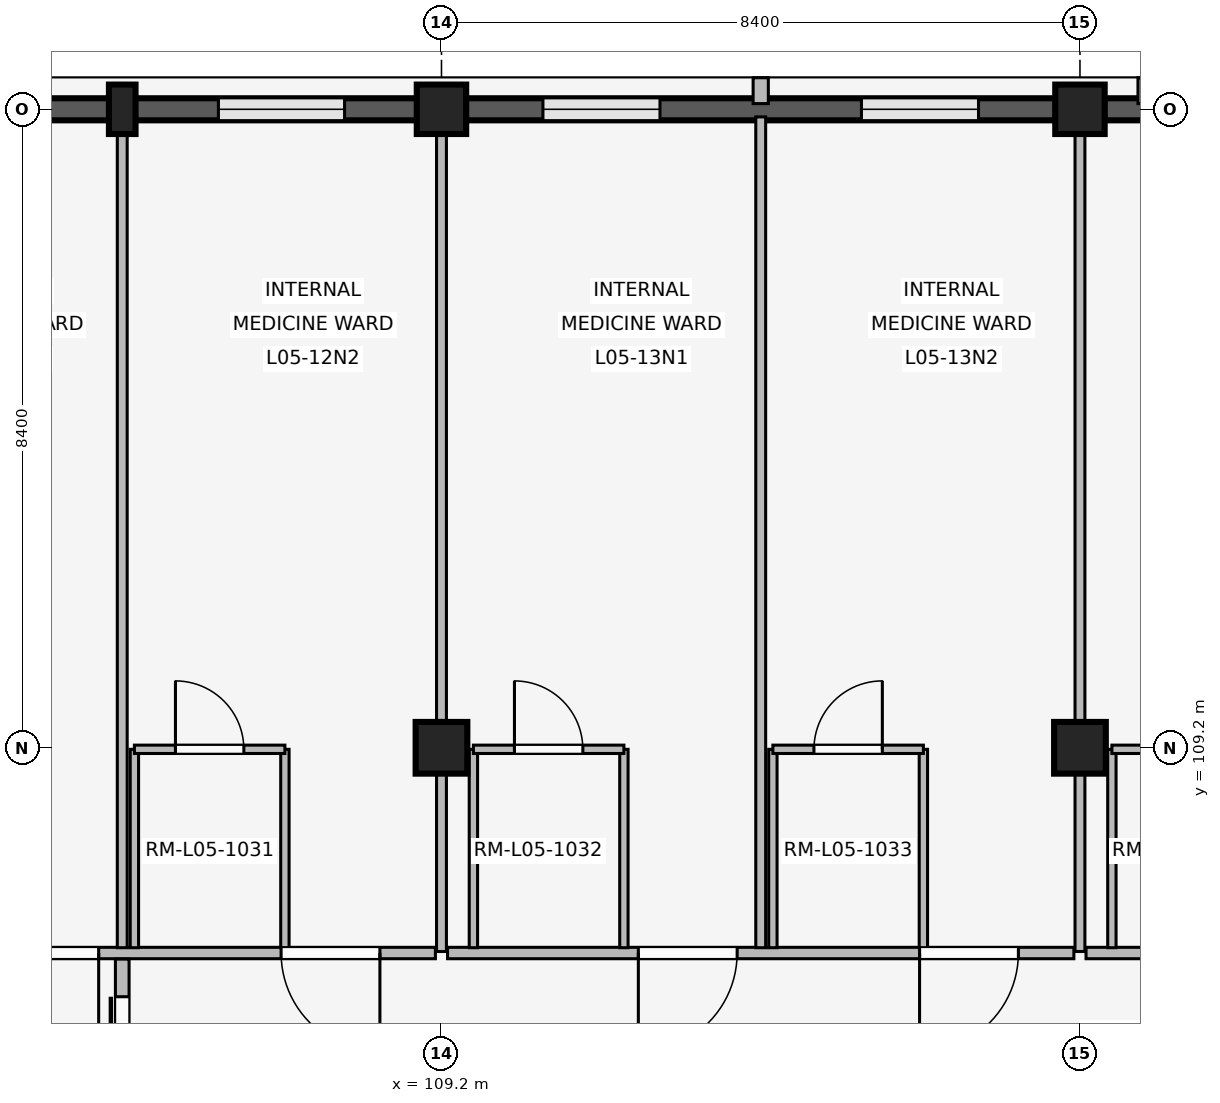
"""IFC4 building model, lengths in metres.
Left out: names, types, materials, properties, quantities, classifications, styles, units other than length and angle.
Written with IfcOpenShell. Run it as: python <this file> out.ifc"""

import sys

from ifc_helpers import new_model, si_unit, direction, frame, frame_2d, origin, origin_2d, place, context, subcontext, project, spatial, rectangle, extrude, element, fill, save


model = new_model("IFC4")
c1 = context("Model", 3, precision=1e-05, world=origin(), true_north=direction((0.0, 1.0)))
c2 = subcontext(c1, "Body", "Model", "MODEL_VIEW")
j1 = project(units=[si_unit("LENGTHUNIT", "METRE"), si_unit("PLANEANGLEUNIT", "RADIAN")], contexts=[c1])
p1 = place(None, origin())
s1 = spatial("IfcSite", under=j1, at=p1, CompositionType="ELEMENT")
p2 = place(p1, origin())
s2 = spatial("IfcBuilding", under=s1, at=p2, CompositionType="ELEMENT")
p3 = place(p2, frame((0.0, 0.0, 20.4)))
s3 = spatial("IfcBuildingStorey", under=s2, at=p3, CompositionType="ELEMENT", Elevation=20.4)
p4 = place(p3, frame((109.2, 109.2, 0.0), z_axis=(0.0, 0.0, 1.0), x_axis=(1.0, 0.0, 0.0)))
e1 = element("IfcColumn", 1, at=p4, inside=s3, PredefinedType="COLUMN", context=c2, shape_type="SweptSolid", body=[
    extrude(rectangle(XDim=0.68, YDim=0.68, at=origin_2d()), origin(), (0.0, 0.0, 1.0), 4.2),
])
p5 = place(p3, frame((109.2, 117.6, 0.0), z_axis=(0.0, 0.0, 1.0), x_axis=(1.0, 0.0, 0.0)))
e2 = element("IfcColumn", 2, at=p5, inside=s3, PredefinedType="COLUMN", context=c2, shape_type="SweptSolid", body=[
    extrude(rectangle(XDim=0.65, YDim=0.65, at=origin_2d()), origin(), (0.0, 0.0, 1.0), 4.2),
])
p6 = place(p3, frame((117.6, 109.2, 0.0), z_axis=(0.0, 0.0, 1.0), x_axis=(1.0, 0.0, 0.0)))
e3 = element("IfcColumn", 3, at=p6, inside=s3, PredefinedType="COLUMN", context=c2, shape_type="SweptSolid", body=[
    extrude(rectangle(XDim=0.68, YDim=0.68, at=origin_2d()), origin(), (0.0, 0.0, 1.0), 4.2),
])
p7 = place(p3, frame((117.6, 117.6, 0.0), z_axis=(0.0, 0.0, 1.0), x_axis=(1.0, 0.0, 0.0)))
e4 = element("IfcColumn", 4, at=p7, inside=s3, PredefinedType="COLUMN", context=c2, shape_type="SweptSolid", body=[
    extrude(rectangle(XDim=0.65, YDim=0.65, at=origin_2d()), origin(), (0.0, 0.0, 1.0), 4.2),
])
p8 = place(p3, frame((105.0, 117.6, 0.0), z_axis=(0.0, 0.0, 1.0), x_axis=(1.0, 0.0, 0.0)))
e5 = element("IfcColumn", 5, at=p8, inside=s3, PredefinedType="PILASTER", context=c2, shape_type="SweptSolid", body=[
    extrude(rectangle(XDim=0.35, YDim=0.65, at=origin_2d()), origin(), (0.0, 0.0, 1.0), 4.2),
])
p9 = place(p3, frame((101.12, 117.6, 0.0), z_axis=(0.0, 0.0, 1.0), x_axis=(1.0, 0.0, 0.0)))
e6 = element("IfcWall", 6, at=p9, inside=s3, PredefinedType="SOLIDWALL", context=c2, shape_type="SweptSolid", body=[
    extrude(rectangle(XDim=7.76, YDim=0.29, at=frame_2d((3.88, 0.0))), origin(), (0.0, 0.0, 1.0), 3.34),
])
p10 = place(p9, frame((0.955, 0.0, 0.85)))
e7 = element("IfcOpeningElement", 7, at=p10, cuts=e6, PredefinedType="OPENING", context=c2, shape_type="SweptSolid", body=[
    extrude(rectangle(XDim=1.66, YDim=1.95, at=frame_2d((0.83, 0.975))), frame((0.0, 0.155, 0.0), z_axis=(0.0, -1.0, 0.0), x_axis=(1.0, 0.0, 0.0)), (0.0, 0.0, 1.0), 0.31),
])
p11 = place(p9, frame((5.145, 0.0, 0.85)))
e8 = element("IfcOpeningElement", 8, at=p11, cuts=e6, PredefinedType="OPENING", context=c2, shape_type="SweptSolid", body=[
    extrude(rectangle(XDim=1.66, YDim=1.95, at=frame_2d((0.83, 0.975))), frame((0.0, 0.155, 0.0), z_axis=(0.0, -1.0, 0.0), x_axis=(1.0, 0.0, 0.0)), (0.0, 0.0, 1.0), 0.31),
])
p12 = place(p3, frame((109.52, 117.6, 0.0), z_axis=(0.0, 0.0, 1.0), x_axis=(1.0, 0.0, 0.0)))
e9 = element("IfcWall", 9, at=p12, inside=s3, PredefinedType="SOLIDWALL", context=c2, shape_type="SweptSolid", body=[
    extrude(rectangle(XDim=7.76, YDim=0.29, at=frame_2d((3.88, 0.0))), origin(), (0.0, 0.0, 1.0), 3.34),
])
p13 = place(p12, frame((1.015, 0.0, 0.85)))
e10 = element("IfcOpeningElement", 10, at=p13, cuts=e9, PredefinedType="OPENING", context=c2, shape_type="SweptSolid", body=[
    extrude(rectangle(XDim=1.54, YDim=1.85, at=frame_2d((0.77, 0.925))), frame((0.0, 0.155, 0.0), z_axis=(0.0, -1.0, 0.0), x_axis=(1.0, 0.0, 0.0)), (0.0, 0.0, 1.0), 0.31),
])
p14 = place(p12, frame((5.205, 0.0, 0.85)))
e11 = element("IfcOpeningElement", 11, at=p14, cuts=e9, PredefinedType="OPENING", context=c2, shape_type="SweptSolid", body=[
    extrude(rectangle(XDim=1.54, YDim=1.85, at=frame_2d((0.77, 0.925))), frame((0.0, 0.155, 0.0), z_axis=(0.0, -1.0, 0.0), x_axis=(1.0, 0.0, 0.0)), (0.0, 0.0, 1.0), 0.31),
])
p15 = place(p3, frame((113.4, 117.675, 0.0), z_axis=(0.0, 0.0, 1.0), x_axis=(0.0, 1.0, 0.0)))
e12 = element("IfcWall", 12, at=p15, inside=s3, PredefinedType="ELEMENTEDWALL", context=c2, shape_type="SweptSolid", body=[
    extrude(rectangle(XDim=0.34, YDim=0.2, at=frame_2d((0.17, 0.0))), origin(), (0.0, 0.0, 1.0), 3.32),
])
p16 = place(p3, frame((117.92, 117.6, 0.0), z_axis=(0.0, 0.0, 1.0), x_axis=(1.0, 0.0, 0.0)))
e13 = element("IfcWall", 13, at=p16, inside=s3, PredefinedType="SOLIDWALL", context=c2, shape_type="SweptSolid", body=[
    extrude(rectangle(XDim=7.76, YDim=0.29, at=frame_2d((3.88, 0.0))), origin(), (0.0, 0.0, 1.0), 3.34),
])
p17 = place(p16, frame((0.945, 0.0, 0.85)))
e14 = element("IfcOpeningElement", 14, at=p17, cuts=e13, PredefinedType="OPENING", context=c2, shape_type="SweptSolid", body=[
    extrude(rectangle(XDim=1.68, YDim=2.05, at=frame_2d((0.84, 1.025))), frame((0.0, 0.155, 0.0), z_axis=(0.0, -1.0, 0.0), x_axis=(1.0, 0.0, 0.0)), (0.0, 0.0, 1.0), 0.31),
])
p18 = place(p16, frame((5.135, 0.0, 0.85)))
e15 = element("IfcOpeningElement", 15, at=p18, cuts=e13, PredefinedType="OPENING", context=c2, shape_type="SweptSolid", body=[
    extrude(rectangle(XDim=1.68, YDim=2.05, at=frame_2d((0.84, 1.025))), frame((0.0, 0.155, 0.0), z_axis=(0.0, -1.0, 0.0), x_axis=(1.0, 0.0, 0.0)), (0.0, 0.0, 1.0), 0.31),
])
p19 = place(p3, frame((118.463, 117.675, 0.0), z_axis=(0.0, 0.0, 1.0), x_axis=(0.0, 1.0, 0.0)))
e16 = element("IfcWall", 16, at=p19, inside=s3, PredefinedType="ELEMENTEDWALL", context=c2, shape_type="SweptSolid", body=[
    extrude(rectangle(XDim=0.34, YDim=0.2, at=frame_2d((0.17, 0.0))), origin(), (0.0, 0.0, 1.0), 3.32),
])
p20 = place(p3, frame((109.12, 106.5, 0.0), z_axis=(0.0, 0.0, 1.0), x_axis=(-1.0, 0.0, 0.0)))
e17 = element("IfcWall", 17, at=p20, inside=s3, PredefinedType="PARTITIONING", context=c2, shape_type="SweptSolid", body=[
    extrude(rectangle(XDim=8.24, YDim=0.15, at=frame_2d((4.12, 0.0))), origin(), (0.0, 0.0, 1.0), 3.32),
])
p21 = place(p20, frame((0.73, 0.0, 0.0)))
e18 = element("IfcOpeningElement", 18, at=p21, cuts=e17, PredefinedType="OPENING", context=c2, shape_type="SweptSolid", body=[
    extrude(rectangle(XDim=1.3, YDim=2.25, at=frame_2d((0.65, 1.125))), frame((0.0, 0.085, 0.0), z_axis=(0.0, -1.0, 0.0), x_axis=(1.0, 0.0, 0.0)), (0.0, 0.0, 1.0), 0.17),
])
p22 = place(p20, frame((4.43, 0.0, 0.0)))
e19 = element("IfcOpeningElement", 19, at=p22, cuts=e17, PredefinedType="OPENING", context=c2, shape_type="SweptSolid", body=[
    extrude(rectangle(XDim=1.3, YDim=2.25, at=frame_2d((0.65, 1.125))), frame((0.0, 0.085, 0.0), z_axis=(0.0, -1.0, 0.0), x_axis=(1.0, 0.0, 0.0)), (0.0, 0.0, 1.0), 0.17),
])
p23 = place(p3, frame((105.0, 106.57, 0.0), z_axis=(0.0, 0.0, 1.0), x_axis=(0.0, 1.0, 0.0)))
e20 = element("IfcWall", 20, at=p23, inside=s3, PredefinedType="PARTITIONING", context=c2, shape_type="SweptSolid", body=[
    extrude(rectangle(XDim=10.93, YDim=0.13, at=frame_2d((5.465, 0.0))), origin(), (0.0, 0.0, 1.0), 3.32),
])
for number, where, z_axis, x_axis in (
    (21, (105.16, 106.57, 0.0), (0.0, 0.0, 1.0), (0.0, 1.0, 0.0)),
    (22, (107.14, 106.57, 0.0), (0.0, 0.0, 1.0), (0.0, 1.0, 0.0)),
):
    element("IfcWall", number, at=place(p3, frame(where, z_axis=z_axis, x_axis=x_axis)), inside=s3, PredefinedType="PARTITIONING", context=c2, shape_type="SweptSolid", body=[
        extrude(rectangle(XDim=2.61, YDim=0.11, at=frame_2d((1.305, 0.0))), origin(), (0.0, 0.0, 1.0), 3.32),
    ])
p24 = place(p3, frame((105.16, 109.18, 0.0), z_axis=(0.0, 0.0, 1.0), x_axis=(1.0, 0.0, 0.0)))
e23 = element("IfcWall", 23, at=p24, inside=s3, PredefinedType="PARTITIONING", context=c2, shape_type="SweptSolid", body=[
    extrude(rectangle(XDim=1.98, YDim=0.11, at=frame_2d((0.99, 0.0))), origin(), (0.0, 0.0, 1.0), 3.32),
])
p25 = place(p24, frame((0.54, 0.0, 0.0)))
e24 = element("IfcOpeningElement", 24, at=p25, cuts=e23, PredefinedType="OPENING", context=c2, shape_type="SweptSolid", body=[
    extrude(rectangle(XDim=0.9, YDim=2.1, at=frame_2d((0.45, 1.05))), frame((0.0, 0.065, 0.0), z_axis=(0.0, -1.0, 0.0), x_axis=(1.0, 0.0, 0.0)), (0.0, 0.0, 1.0), 0.13),
])
p26 = place(p3, frame((105.0, 103.58, 0.0), z_axis=(0.0, 0.0, 1.0), x_axis=(0.0, 1.0, 0.0)))
e25 = element("IfcWall", 25, at=p26, inside=s3, PredefinedType="PARTITIONING", context=c2, shape_type="SweptSolid", body=[
    extrude(rectangle(XDim=2.84, YDim=0.18, at=frame_2d((1.42, 0.0))), origin(), (0.0, 0.0, 1.0), 3.32),
])
p27 = place(p26, frame((0.495, 0.0, 0.0)))
e26 = element("IfcOpeningElement", 26, at=p27, cuts=e25, PredefinedType="OPENING", context=c2, shape_type="SweptSolid", body=[
    extrude(rectangle(XDim=1.85, YDim=2.3, at=frame_2d((0.925, 1.15))), frame((0.0, 0.1, 0.0), z_axis=(0.0, -1.0, 0.0), x_axis=(1.0, 0.0, 0.0)), (0.0, 0.0, 1.0), 0.2),
])
p28 = place(p3, frame((109.2, 106.52, 0.0), z_axis=(0.0, 0.0, 1.0), x_axis=(0.0, 1.0, 0.0)))
e27 = element("IfcWall", 27, at=p28, inside=s3, PredefinedType="PARTITIONING", context=c2, shape_type="SweptSolid", body=[
    extrude(rectangle(XDim=10.94, YDim=0.13, at=frame_2d((5.47, 0.0))), origin(), (0.0, 0.0, 1.0), 3.32),
])
p29 = place(p3, frame((117.52, 106.5, 0.0), z_axis=(0.0, 0.0, 1.0), x_axis=(-1.0, 0.0, 0.0)))
e28 = element("IfcWall", 28, at=p29, inside=s3, PredefinedType="PARTITIONING", context=c2, shape_type="SweptSolid", body=[
    extrude(rectangle(XDim=8.24, YDim=0.15, at=frame_2d((4.12, 0.0))), origin(), (0.0, 0.0, 1.0), 3.32),
])
p30 = place(p29, frame((0.73, 0.0, 0.0)))
e29 = element("IfcOpeningElement", 29, at=p30, cuts=e28, PredefinedType="OPENING", context=c2, shape_type="SweptSolid", body=[
    extrude(rectangle(XDim=1.3, YDim=2.25, at=frame_2d((0.65, 1.125))), frame((0.0, 0.085, 0.0), z_axis=(0.0, -1.0, 0.0), x_axis=(1.0, 0.0, 0.0)), (0.0, 0.0, 1.0), 0.17),
])
p31 = place(p29, frame((4.43, 0.0, 0.0)))
e30 = element("IfcOpeningElement", 30, at=p31, cuts=e28, PredefinedType="OPENING", context=c2, shape_type="SweptSolid", body=[
    extrude(rectangle(XDim=1.3, YDim=2.25, at=frame_2d((0.65, 1.125))), frame((0.0, 0.085, 0.0), z_axis=(0.0, -1.0, 0.0), x_axis=(1.0, 0.0, 0.0)), (0.0, 0.0, 1.0), 0.17),
])
p32 = place(p3, frame((113.4, 106.57, 0.0), z_axis=(0.0, 0.0, 1.0), x_axis=(0.0, 1.0, 0.0)))
e31 = element("IfcWall", 31, at=p32, inside=s3, PredefinedType="PARTITIONING", context=c2, shape_type="SweptSolid", body=[
    extrude(rectangle(XDim=10.93, YDim=0.13, at=frame_2d((5.465, 0.0))), origin(), (0.0, 0.0, 1.0), 3.32),
])
for number, where, z_axis, x_axis in (
    (32, (109.62, 106.57, 0.0), (0.0, 0.0, 1.0), (0.0, 1.0, 0.0)),
    (33, (111.6, 106.57, 0.0), (0.0, 0.0, 1.0), (0.0, 1.0, 0.0)),
):
    element("IfcWall", number, at=place(p3, frame(where, z_axis=z_axis, x_axis=x_axis)), inside=s3, PredefinedType="PARTITIONING", context=c2, shape_type="SweptSolid", body=[
        extrude(rectangle(XDim=2.61, YDim=0.11, at=frame_2d((1.305, 0.0))), origin(), (0.0, 0.0, 1.0), 3.32),
    ])
p33 = place(p3, frame((109.62, 109.18, 0.0), z_axis=(0.0, 0.0, 1.0), x_axis=(1.0, 0.0, 0.0)))
e34 = element("IfcWall", 34, at=p33, inside=s3, PredefinedType="PARTITIONING", context=c2, shape_type="SweptSolid", body=[
    extrude(rectangle(XDim=1.98, YDim=0.11, at=frame_2d((0.99, 0.0))), origin(), (0.0, 0.0, 1.0), 3.32),
])
p34 = place(p33, frame((0.54, 0.0, 0.0)))
e35 = element("IfcOpeningElement", 35, at=p34, cuts=e34, PredefinedType="OPENING", context=c2, shape_type="SweptSolid", body=[
    extrude(rectangle(XDim=0.9, YDim=2.1, at=frame_2d((0.45, 1.05))), frame((0.0, 0.065, 0.0), z_axis=(0.0, -1.0, 0.0), x_axis=(1.0, 0.0, 0.0)), (0.0, 0.0, 1.0), 0.13),
])
for number, where, z_axis, x_axis in (
    (36, (113.56, 106.57, 0.0), (0.0, 0.0, 1.0), (0.0, 1.0, 0.0)),
    (37, (115.54, 106.57, 0.0), (0.0, 0.0, 1.0), (0.0, 1.0, 0.0)),
):
    element("IfcWall", number, at=place(p3, frame(where, z_axis=z_axis, x_axis=x_axis)), inside=s3, PredefinedType="PARTITIONING", context=c2, shape_type="SweptSolid", body=[
        extrude(rectangle(XDim=2.61, YDim=0.11, at=frame_2d((1.305, 0.0))), origin(), (0.0, 0.0, 1.0), 3.32),
    ])
p35 = place(p3, frame((113.56, 109.18, 0.0), z_axis=(0.0, 0.0, 1.0), x_axis=(1.0, 0.0, 0.0)))
e38 = element("IfcWall", 38, at=p35, inside=s3, PredefinedType="PARTITIONING", context=c2, shape_type="SweptSolid", body=[
    extrude(rectangle(XDim=1.98, YDim=0.11, at=frame_2d((0.99, 0.0))), origin(), (0.0, 0.0, 1.0), 3.32),
])
p36 = place(p35, frame((0.54, 0.0, 0.0)))
e39 = element("IfcOpeningElement", 39, at=p36, cuts=e38, PredefinedType="OPENING", context=c2, shape_type="SweptSolid", body=[
    extrude(rectangle(XDim=0.9, YDim=2.1, at=frame_2d((0.45, 1.05))), frame((0.0, 0.065, 0.0), z_axis=(0.0, -1.0, 0.0), x_axis=(1.0, 0.0, 0.0)), (0.0, 0.0, 1.0), 0.13),
])
p37 = place(p3, frame((117.6, 106.52, 0.0), z_axis=(0.0, 0.0, 1.0), x_axis=(0.0, 1.0, 0.0)))
e40 = element("IfcWall", 40, at=p37, inside=s3, PredefinedType="PARTITIONING", context=c2, shape_type="SweptSolid", body=[
    extrude(rectangle(XDim=10.94, YDim=0.13, at=frame_2d((5.47, 0.0))), origin(), (0.0, 0.0, 1.0), 3.32),
])
p38 = place(p3, frame((125.92, 106.5, 0.0), z_axis=(0.0, 0.0, 1.0), x_axis=(-1.0, 0.0, 0.0)))
e41 = element("IfcWall", 41, at=p38, inside=s3, PredefinedType="PARTITIONING", context=c2, shape_type="SweptSolid", body=[
    extrude(rectangle(XDim=8.24, YDim=0.15, at=frame_2d((4.12, 0.0))), origin(), (0.0, 0.0, 1.0), 3.32),
])
p39 = place(p38, frame((0.73, 0.0, 0.0)))
e42 = element("IfcOpeningElement", 42, at=p39, cuts=e41, PredefinedType="OPENING", context=c2, shape_type="SweptSolid", body=[
    extrude(rectangle(XDim=1.3, YDim=2.25, at=frame_2d((0.65, 1.125))), frame((0.0, 0.085, 0.0), z_axis=(0.0, -1.0, 0.0), x_axis=(1.0, 0.0, 0.0)), (0.0, 0.0, 1.0), 0.17),
])
p40 = place(p38, frame((4.43, 0.0, 0.0)))
e43 = element("IfcOpeningElement", 43, at=p40, cuts=e41, PredefinedType="OPENING", context=c2, shape_type="SweptSolid", body=[
    extrude(rectangle(XDim=1.3, YDim=2.25, at=frame_2d((0.65, 1.125))), frame((0.0, 0.085, 0.0), z_axis=(0.0, -1.0, 0.0), x_axis=(1.0, 0.0, 0.0)), (0.0, 0.0, 1.0), 0.17),
])
p41 = place(p3, frame((118.02, 106.57, 0.0), z_axis=(0.0, 0.0, 1.0), x_axis=(0.0, 1.0, 0.0)))
e44 = element("IfcWall", 44, at=p41, inside=s3, PredefinedType="PARTITIONING", context=c2, shape_type="SweptSolid", body=[
    extrude(rectangle(XDim=2.61, YDim=0.11, at=frame_2d((1.305, 0.0))), origin(), (0.0, 0.0, 1.0), 3.32),
])
p42 = place(p3, frame((118.02, 109.18, 0.0), z_axis=(0.0, 0.0, 1.0), x_axis=(1.0, 0.0, 0.0)))
e45 = element("IfcWall", 45, at=p42, inside=s3, PredefinedType="PARTITIONING", context=c2, shape_type="SweptSolid", body=[
    extrude(rectangle(XDim=1.98, YDim=0.11, at=frame_2d((0.99, 0.0))), origin(), (0.0, 0.0, 1.0), 3.32),
])
p43 = place(p42, frame((0.54, 0.0, 0.0)))
e46 = element("IfcOpeningElement", 46, at=p43, cuts=e45, PredefinedType="OPENING", context=c2, shape_type="SweptSolid", body=[
    extrude(rectangle(XDim=0.9, YDim=2.1, at=frame_2d((0.45, 1.05))), frame((0.0, 0.065, 0.0), z_axis=(0.0, -1.0, 0.0), x_axis=(1.0, 0.0, 0.0)), (0.0, 0.0, 1.0), 0.13),
])
p44 = place(p11, origin())
e47 = element("IfcWindow", 47, at=p44, inside=s3, PartitioningType="SINGLE_PANEL", PredefinedType="WINDOW", context=c2, shape_type="SweptSolid", body=[
    extrude(rectangle(XDim=1.66, YDim=1.95, at=frame_2d((0.83, 0.975))), frame((0.0, 0.03, 0.0), z_axis=(0.0, -1.0, 0.0), x_axis=(1.0, 0.0, 0.0)), (0.0, 0.0, 1.0), 0.06),
])
fill(e8, e47)
p45 = place(p13, origin())
e48 = element("IfcWindow", 48, at=p45, inside=s3, PartitioningType="SINGLE_PANEL", PredefinedType="WINDOW", context=c2, shape_type="SweptSolid", body=[
    extrude(rectangle(XDim=1.54, YDim=1.85, at=frame_2d((0.77, 0.925))), frame((0.0, 0.03, 0.0), z_axis=(0.0, -1.0, 0.0), x_axis=(1.0, 0.0, 0.0)), (0.0, 0.0, 1.0), 0.06),
])
fill(e10, e48)
p46 = place(p14, origin())
e49 = element("IfcWindow", 49, at=p46, inside=s3, PartitioningType="SINGLE_PANEL", PredefinedType="WINDOW", context=c2, shape_type="SweptSolid", body=[
    extrude(rectangle(XDim=1.54, YDim=1.85, at=frame_2d((0.77, 0.925))), frame((0.0, 0.03, 0.0), z_axis=(0.0, -1.0, 0.0), x_axis=(1.0, 0.0, 0.0)), (0.0, 0.0, 1.0), 0.06),
])
fill(e11, e49)
p47 = place(p21, origin())
e50 = element("IfcDoor", 50, at=p47, inside=s3, OperationType="SINGLE_SWING_LEFT", PredefinedType="DOOR", context=c2, shape_type="SweptSolid", body=[
    extrude(rectangle(XDim=1.3, YDim=2.25, at=frame_2d((0.65, 1.125))), frame((0.0, 0.025, 0.0), z_axis=(0.0, -1.0, 0.0), x_axis=(1.0, 0.0, 0.0)), (0.0, 0.0, 1.0), 0.05),
])
fill(e18, e50)
p48 = place(p22, origin())
e51 = element("IfcDoor", 51, at=p48, inside=s3, OperationType="SINGLE_SWING_LEFT", PredefinedType="DOOR", context=c2, shape_type="SweptSolid", body=[
    extrude(rectangle(XDim=1.3, YDim=2.25, at=frame_2d((0.65, 1.125))), frame((0.0, 0.025, 0.0), z_axis=(0.0, -1.0, 0.0), x_axis=(1.0, 0.0, 0.0)), (0.0, 0.0, 1.0), 0.05),
])
fill(e19, e51)
p49 = place(p25, origin())
e52 = element("IfcDoor", 52, at=p49, inside=s3, OperationType="SINGLE_SWING_LEFT", PredefinedType="DOOR", context=c2, shape_type="SweptSolid", body=[
    extrude(rectangle(XDim=0.9, YDim=2.1, at=frame_2d((0.45, 1.05))), frame((0.0, 0.025, 0.0), z_axis=(0.0, -1.0, 0.0), x_axis=(1.0, 0.0, 0.0)), (0.0, 0.0, 1.0), 0.05),
])
fill(e24, e52)
p50 = place(p27, origin())
e53 = element("IfcDoor", 53, at=p50, inside=s3, OperationType="SLIDING_TO_LEFT", PredefinedType="DOOR", context=c2, shape_type="SweptSolid", body=[
    extrude(rectangle(XDim=1.85, YDim=2.3, at=frame_2d((0.925, 1.15))), frame((0.0, 0.025, 0.0), z_axis=(0.0, -1.0, 0.0), x_axis=(1.0, 0.0, 0.0)), (0.0, 0.0, 1.0), 0.05),
])
fill(e26, e53)
p51 = place(p30, origin())
e54 = element("IfcDoor", 54, at=p51, inside=s3, OperationType="SINGLE_SWING_RIGHT", PredefinedType="DOOR", context=c2, shape_type="SweptSolid", body=[
    extrude(rectangle(XDim=1.3, YDim=2.25, at=frame_2d((0.65, 1.125))), frame((0.0, 0.025, 0.0), z_axis=(0.0, -1.0, 0.0), x_axis=(1.0, 0.0, 0.0)), (0.0, 0.0, 1.0), 0.05),
])
fill(e29, e54)
p52 = place(p31, origin())
e55 = element("IfcDoor", 55, at=p52, inside=s3, OperationType="SINGLE_SWING_RIGHT", PredefinedType="DOOR", context=c2, shape_type="SweptSolid", body=[
    extrude(rectangle(XDim=1.3, YDim=2.25, at=frame_2d((0.65, 1.125))), frame((0.0, 0.025, 0.0), z_axis=(0.0, -1.0, 0.0), x_axis=(1.0, 0.0, 0.0)), (0.0, 0.0, 1.0), 0.05),
])
fill(e30, e55)
p53 = place(p34, origin())
e56 = element("IfcDoor", 56, at=p53, inside=s3, OperationType="SINGLE_SWING_LEFT", PredefinedType="DOOR", context=c2, shape_type="SweptSolid", body=[
    extrude(rectangle(XDim=0.9, YDim=2.1, at=frame_2d((0.45, 1.05))), frame((0.0, 0.025, 0.0), z_axis=(0.0, -1.0, 0.0), x_axis=(1.0, 0.0, 0.0)), (0.0, 0.0, 1.0), 0.05),
])
fill(e35, e56)
p54 = place(p36, origin())
e57 = element("IfcDoor", 57, at=p54, inside=s3, OperationType="SINGLE_SWING_RIGHT", PredefinedType="DOOR", context=c2, shape_type="SweptSolid", body=[
    extrude(rectangle(XDim=0.9, YDim=2.1, at=frame_2d((0.45, 1.05))), frame((0.0, 0.025, 0.0), z_axis=(0.0, -1.0, 0.0), x_axis=(1.0, 0.0, 0.0)), (0.0, 0.0, 1.0), 0.05),
])
fill(e39, e57)
save(model, sys.argv[1])
